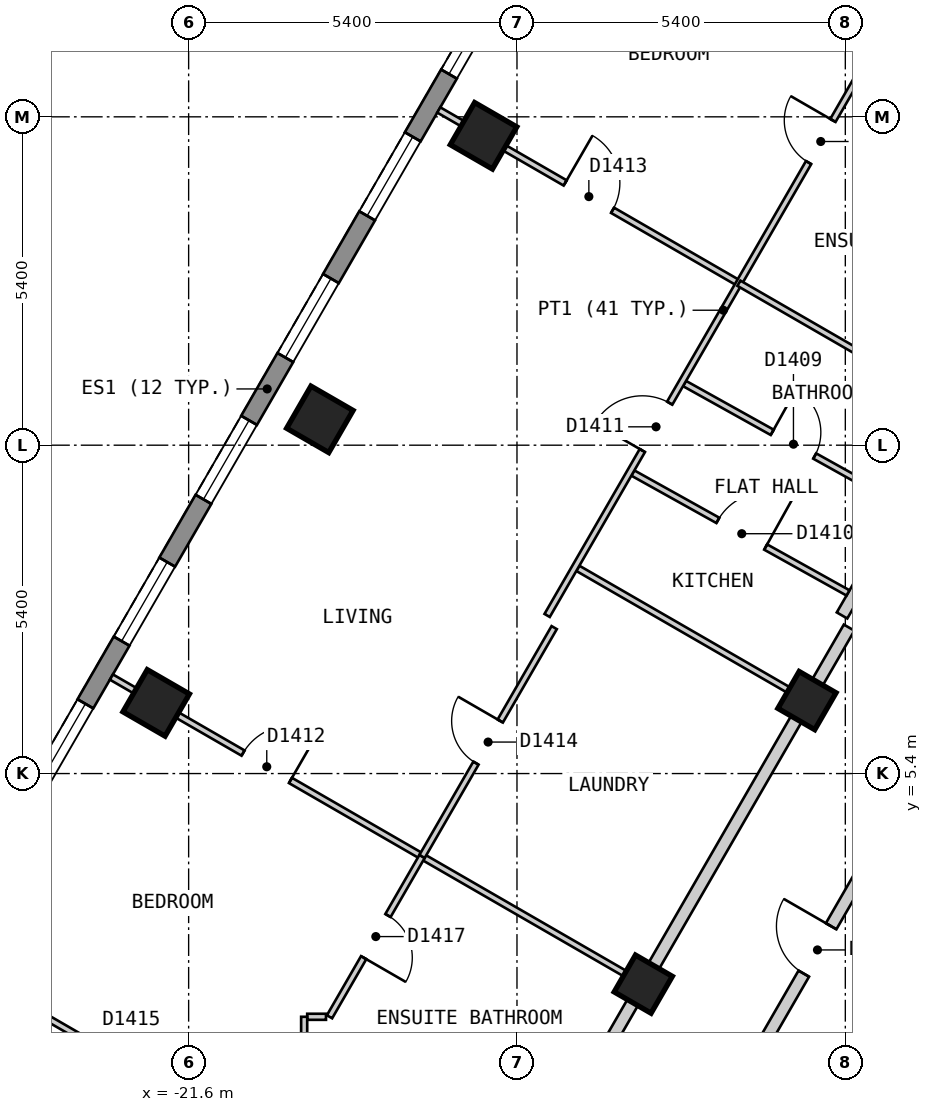
"""IFC4 building model, lengths in metres.
Left out: names, types, materials, properties, quantities, classifications, styles, units other than length and angle.
Written with IfcOpenShell. Run it as: python <this file> out.ifc"""

import sys

from ifc_helpers import new_model, si_unit, direction, frame, frame_2d, origin, origin_2d, place, context, subcontext, project, spatial, polyline, rectangle, outline, extrude, element, fill, save


model = new_model("IFC4")
c1 = context("Model", 3, precision=1e-05, world=origin(), true_north=direction((0.0, 1.0)))
c2 = subcontext(c1, "Body", "Model", "MODEL_VIEW")
j1 = project(units=[si_unit("LENGTHUNIT", "METRE"), si_unit("PLANEANGLEUNIT", "RADIAN")], contexts=[c1])
p1 = place(None, origin())
s1 = spatial("IfcSite", under=j1, at=p1, CompositionType="ELEMENT")
p2 = place(p1, origin())
s2 = spatial("IfcBuilding", under=s1, at=p2, CompositionType="ELEMENT")
p3 = place(p2, frame((0.0, 0.0, 172.2)))
s3 = spatial("IfcBuildingStorey", under=s2, at=p3, CompositionType="ELEMENT", Elevation=172.2)
for number, where, z_axis, x_axis in (
    (1, (-16.75, 15.888, 0.0), (0.0, 0.0, 1.0), (-0.5, -0.866, 0.0)),
    (2, (-19.442, 11.225, 0.0), (0.0, 0.0, 1.0), (-0.5, -0.866, 0.0)),
    (3, (-22.134, 6.562, 0.0), (0.0, 0.0, 1.0), (-0.5, -0.866, 0.0)),
):
    element("IfcColumn", number, at=place(p3, frame(where, z_axis=z_axis, x_axis=x_axis)), inside=s3, PredefinedType="COLUMN", context=c2, shape_type="SweptSolid", body=[
        extrude(rectangle(XDim=0.8, YDim=0.8, at=origin_2d()), origin(), (0.0, 0.0, 1.0), 3.0),
    ])
for number, where, z_axis, x_axis in (
    (4, (-11.431, 6.6, 0.0), (0.0, 0.0, 1.0), (-0.5, -0.866, 0.0)),
    (5, (-14.123, 1.937, 0.0), (0.0, 0.0, 1.0), (-0.5, -0.866, 0.0)),
):
    element("IfcColumn", number, at=place(p3, frame(where, z_axis=z_axis, x_axis=x_axis)), inside=s3, PredefinedType="COLUMN", context=c2, shape_type="SweptSolid", body=[
        extrude(rectangle(XDim=0.7, YDim=0.7, at=origin_2d()), origin(), (0.0, 0.0, 1.0), 3.0),
    ])
p4 = place(p3, frame((-14.592, 21.625, 0.0), z_axis=(0.0, 0.0, 1.0), x_axis=(-0.500010537973, -0.866019319597, 0.0)))
e6 = element("IfcWall", 6, at=p4, inside=s3, PredefinedType="SOLIDWALL", context=c2, shape_type="SweptSolid", body=[
    extrude(outline(polyline([(0.0, -0.15), (22.863, -0.15), (22.783, 0.15), (0.08, 0.15), (0.0, -0.15)])), origin(), (0.0, 0.0, 1.0), 2.7),
])
p5 = place(p4, frame((1.259, 0.0, 0.15)))
e7 = element("IfcOpeningElement", 7, at=p5, cuts=e6, PredefinedType="OPENING", context=c2, shape_type="SweptSolid", body=[
    extrude(rectangle(XDim=1.5, YDim=2.1, at=frame_2d((0.75, 1.05))), frame((0.0, 0.16, 0.0), z_axis=(0.0, -1.0, 0.0), x_axis=(1.0, 0.0, 0.0)), (0.0, 0.0, 1.0), 0.32),
])
p6 = place(p4, frame((3.952, 0.0, 0.15)))
e8 = element("IfcOpeningElement", 8, at=p6, cuts=e6, PredefinedType="OPENING", context=c2, shape_type="SweptSolid", body=[
    extrude(rectangle(XDim=1.5, YDim=2.1, at=frame_2d((0.75, 1.05))), frame((0.0, 0.16, 0.0), z_axis=(0.0, -1.0, 0.0), x_axis=(1.0, 0.0, 0.0)), (0.0, 0.0, 1.0), 0.32),
])
p7 = place(p4, frame((6.644, 0.0, 0.15)))
e9 = element("IfcOpeningElement", 9, at=p7, cuts=e6, PredefinedType="OPENING", context=c2, shape_type="SweptSolid", body=[
    extrude(rectangle(XDim=1.5, YDim=2.1, at=frame_2d((0.75, 1.05))), frame((0.0, 0.16, 0.0), z_axis=(0.0, -1.0, 0.0), x_axis=(1.0, 0.0, 0.0)), (0.0, 0.0, 1.0), 0.32),
])
p8 = place(p4, frame((9.335, 0.0, 0.15)))
e10 = element("IfcOpeningElement", 10, at=p8, cuts=e6, PredefinedType="OPENING", context=c2, shape_type="SweptSolid", body=[
    extrude(rectangle(XDim=1.5, YDim=2.1, at=frame_2d((0.75, 1.05))), frame((0.0, 0.16, 0.0), z_axis=(0.0, -1.0, 0.0), x_axis=(1.0, 0.0, 0.0)), (0.0, 0.0, 1.0), 0.32),
])
p9 = place(p4, frame((12.028, 0.0, 0.15)))
e11 = element("IfcOpeningElement", 11, at=p9, cuts=e6, PredefinedType="OPENING", context=c2, shape_type="SweptSolid", body=[
    extrude(rectangle(XDim=1.5, YDim=2.1, at=frame_2d((0.75, 1.05))), frame((0.0, 0.16, 0.0), z_axis=(0.0, -1.0, 0.0), x_axis=(1.0, 0.0, 0.0)), (0.0, 0.0, 1.0), 0.32),
])
p10 = place(p4, frame((14.72, 0.0, 0.15)))
e12 = element("IfcOpeningElement", 12, at=p10, cuts=e6, PredefinedType="OPENING", context=c2, shape_type="SweptSolid", body=[
    extrude(rectangle(XDim=1.5, YDim=2.1, at=frame_2d((0.75, 1.05))), frame((0.0, 0.16, 0.0), z_axis=(0.0, -1.0, 0.0), x_axis=(1.0, 0.0, 0.0)), (0.0, 0.0, 1.0), 0.32),
])
p11 = place(p4, frame((17.411, 0.0, 0.15)))
e13 = element("IfcOpeningElement", 13, at=p11, cuts=e6, PredefinedType="OPENING", context=c2, shape_type="SweptSolid", body=[
    extrude(rectangle(XDim=1.5, YDim=2.1, at=frame_2d((0.75, 1.05))), frame((0.0, 0.16, 0.0), z_axis=(0.0, -1.0, 0.0), x_axis=(1.0, 0.0, 0.0)), (0.0, 0.0, 1.0), 0.32),
])
p12 = place(p4, frame((20.104, 0.0, 0.15)))
e14 = element("IfcOpeningElement", 14, at=p12, cuts=e6, PredefinedType="OPENING", context=c2, shape_type="SweptSolid", body=[
    extrude(rectangle(XDim=1.5, YDim=2.1, at=frame_2d((0.75, 1.05))), frame((0.0, 0.16, 0.0), z_axis=(0.0, -1.0, 0.0), x_axis=(1.0, 0.0, 0.0)), (0.0, 0.0, 1.0), 0.32),
])
p13 = place(p3, frame((-13.048, -0.601, 0.0), z_axis=(0.0, 0.0, 1.0), x_axis=(0.499982180423, 0.866035691677, 0.0)))
e15 = element("IfcWall", 15, at=p13, inside=s3, PredefinedType="PARTITIONING", context=c2, shape_type="SweptSolid", body=[
    extrude(rectangle(XDim=7.16, YDim=0.2, at=frame_2d((3.58, 0.0))), origin(), (0.0, 0.0, 1.0), 2.7),
])
p14 = place(p13, frame((3.13, 0.0, 0.0)))
e16 = element("IfcOpeningElement", 16, at=p14, cuts=e15, PredefinedType="OPENING", context=c2, shape_type="SweptSolid", body=[
    extrude(rectangle(XDim=0.9, YDim=2.1, at=frame_2d((0.45, 1.05))), frame((0.0, 0.11, 0.0), z_axis=(0.0, -1.0, 0.0), x_axis=(1.0, 0.0, 0.0)), (0.0, 0.0, 1.0), 0.22),
])
p15 = place(p3, frame((-15.53, -0.501, 0.0), z_axis=(0.0, 0.0, 1.0), x_axis=(0.499952498232, 0.866052827206, 0.0)))
e17 = element("IfcWall", 17, at=p15, inside=s3, PredefinedType="PARTITIONING", context=c2, shape_type="SweptSolid", body=[
    extrude(rectangle(XDim=9.585, YDim=0.2, at=frame_2d((4.792, 0.0))), origin(), (0.0, 0.0, 1.0), 2.7),
])
p16 = place(p3, frame((-10.854, 8.0, 0.0), z_axis=(0.0, 0.0, 1.0), x_axis=(0.499997637144, 0.866026767976, 0.0)))
e18 = element("IfcWall", 18, at=p16, inside=s3, PredefinedType="PARTITIONING", context=c2, shape_type="SweptSolid", body=[
    extrude(rectangle(XDim=10.854, YDim=0.2, at=frame_2d((5.427, 0.0))), origin(), (0.0, 0.0, 1.0), 2.7),
])
p17 = place(p16, frame((0.721, 0.0, 0.0)))
e19 = element("IfcOpeningElement", 19, at=p17, cuts=e18, PredefinedType="OPENING", context=c2, shape_type="SweptSolid", body=[
    extrude(rectangle(XDim=1.0, YDim=2.1, at=frame_2d((0.5, 1.05))), frame((0.0, 0.11, 0.0), z_axis=(0.0, -1.0, 0.0), x_axis=(1.0, 0.0, 0.0)), (0.0, 0.0, 1.0), 0.22),
])
p18 = place(p3, frame((-13.444, 11.814, 0.0), z_axis=(0.0, 0.0, 1.0), x_axis=(0.873653620945, -0.486548405207, 0.0)))
e20 = element("IfcWall", 20, at=p18, inside=s3, PredefinedType="PARTITIONING", context=c2, shape_type="SweptSolid", body=[
    extrude(rectangle(XDim=4.051, YDim=0.1, at=frame_2d((2.025, 0.0))), origin(), (0.0, 0.0, 1.0), 2.7),
])
p19 = place(p18, frame((1.65, 0.0, 0.0)))
e21 = element("IfcOpeningElement", 21, at=p19, cuts=e20, PredefinedType="OPENING", context=c2, shape_type="SweptSolid", body=[
    extrude(rectangle(XDim=0.8, YDim=2.1, at=frame_2d((0.4, 1.05))), frame((0.0, 0.06, 0.0), z_axis=(0.0, -1.0, 0.0), x_axis=(1.0, 0.0, 0.0)), (0.0, 0.0, 1.0), 0.12),
])
p20 = place(p3, frame((-14.294, 10.342, 0.0), z_axis=(0.0, 0.0, 1.0), x_axis=(0.873582256032, -0.486676527013, 0.0)))
e22 = element("IfcWall", 22, at=p20, inside=s3, PredefinedType="PARTITIONING", context=c2, shape_type="SweptSolid", body=[
    extrude(rectangle(XDim=4.05, YDim=0.1, at=frame_2d((2.025, 0.0))), origin(), (0.0, 0.0, 1.0), 2.7),
])
p21 = place(p20, frame((1.6, 0.0, 0.0)))
e23 = element("IfcOpeningElement", 23, at=p21, cuts=e22, PredefinedType="OPENING", context=c2, shape_type="SweptSolid", body=[
    extrude(rectangle(XDim=0.9, YDim=2.1, at=frame_2d((0.45, 1.05))), frame((0.0, 0.06, 0.0), z_axis=(0.0, -1.0, 0.0), x_axis=(1.0, 0.0, 0.0)), (0.0, 0.0, 1.0), 0.12),
])
p22 = place(p3, frame((-22.87, 6.987, 0.0), z_axis=(0.0, 0.0, 1.0), x_axis=(0.866022959057, -0.500004234368, 0.0)))
e24 = element("IfcWall", 24, at=p22, inside=s3, PredefinedType="PARTITIONING", context=c2, shape_type="SweptSolid", body=[
    extrude(rectangle(XDim=10.0, YDim=0.1, at=frame_2d((5.0, 0.0))), origin(), (0.0, 0.0, 1.0), 2.7),
])
p23 = place(p22, frame((2.5, 0.0, 0.0)))
e25 = element("IfcOpeningElement", 25, at=p23, cuts=e24, PredefinedType="OPENING", context=c2, shape_type="SweptSolid", body=[
    extrude(rectangle(XDim=0.9, YDim=2.1, at=frame_2d((0.45, 1.05))), frame((0.0, 0.06, 0.0), z_axis=(0.0, -1.0, 0.0), x_axis=(1.0, 0.0, 0.0)), (0.0, 0.0, 1.0), 0.12),
])
p24 = place(p3, frame((-25.562, 2.325, 0.0), z_axis=(0.0, 0.0, 1.0), x_axis=(0.865998530728, -0.500046542611, 0.0)))
e26 = element("IfcWall", 26, at=p24, inside=s3, PredefinedType="PARTITIONING", context=c2, shape_type="SweptSolid", body=[
    extrude(rectangle(XDim=5.651, YDim=0.1, at=frame_2d((2.826, 0.0))), origin(), (0.0, 0.0, 1.0), 2.7),
])
p25 = place(p24, frame((2.476, 0.0, 0.0)))
e27 = element("IfcOpeningElement", 27, at=p25, cuts=e26, PredefinedType="OPENING", context=c2, shape_type="SweptSolid", body=[
    extrude(rectangle(XDim=0.9, YDim=2.1, at=frame_2d((0.45, 1.05))), frame((0.0, 0.06, 0.0), z_axis=(0.0, -1.0, 0.0), x_axis=(1.0, 0.0, 0.0)), (0.0, 0.0, 1.0), 0.12),
])
p26 = place(p3, frame((-15.199, 8.775, 0.0), z_axis=(0.0, 0.0, 1.0), x_axis=(0.866043063166, -0.499969411806, 0.0)))
e28 = element("IfcWall", 28, at=p26, inside=s3, PredefinedType="PARTITIONING", context=c2, shape_type="SweptSolid", body=[
    extrude(rectangle(XDim=4.25, YDim=0.1, at=frame_2d((2.125, 0.0))), origin(), (0.0, 0.0, 1.0), 2.7),
])
p27 = place(p3, frame((-17.486, 16.313, 0.0), z_axis=(0.0, 0.0, 1.0), x_axis=(0.866004402611, -0.500036373335, 0.0)))
e29 = element("IfcWall", 29, at=p27, inside=s3, PredefinedType="PARTITIONING", context=c2, shape_type="SweptSolid", body=[
    extrude(rectangle(XDim=5.7, YDim=0.1, at=frame_2d((2.85, 0.0))), origin(), (0.0, 0.0, 1.0), 2.7),
])
p28 = place(p27, frame((2.4, 0.0, 0.0)))
e30 = element("IfcOpeningElement", 30, at=p28, cuts=e29, PredefinedType="OPENING", context=c2, shape_type="SweptSolid", body=[
    extrude(rectangle(XDim=0.9, YDim=2.1, at=frame_2d((0.45, 1.05))), frame((0.0, 0.06, 0.0), z_axis=(0.0, -1.0, 0.0), x_axis=(1.0, 0.0, 0.0)), (0.0, 0.0, 1.0), 0.12),
])
p29 = place(p3, frame((-19.65, 1.4, 0.0), z_axis=(0.0, 0.0, 1.0), x_axis=(1.0, 0.0, 0.0)))
e31 = element("IfcWall", 31, at=p29, inside=s3, PredefinedType="PARTITIONING", context=c2, shape_type="SweptSolid", body=[
    extrude(rectangle(XDim=0.309, YDim=0.1, at=frame_2d((0.154, 0.0))), origin(), (0.0, 0.0, 1.0), 2.7),
])
p30 = place(p3, frame((-19.283, 1.4, 0.0), z_axis=(0.0, 0.0, 1.0), x_axis=(0.499847391584, 0.866113494368, 0.0)))
e32 = element("IfcWall", 32, at=p30, inside=s3, PredefinedType="PARTITIONING", context=c2, shape_type="SweptSolid", body=[
    extrude(rectangle(XDim=3.045, YDim=0.1, at=frame_2d((1.522, 0.0))), origin(), (0.0, 0.0, 1.0), 2.7),
])
p31 = place(p30, frame((1.123, 0.0, 0.0)))
e33 = element("IfcOpeningElement", 33, at=p31, cuts=e32, PredefinedType="OPENING", context=c2, shape_type="SweptSolid", body=[
    extrude(rectangle(XDim=0.8, YDim=2.1, at=frame_2d((0.4, 1.05))), frame((0.0, 0.06, 0.0), z_axis=(0.0, -1.0, 0.0), x_axis=(1.0, 0.0, 0.0)), (0.0, 0.0, 1.0), 0.12),
])
p32 = place(p3, frame((-15.704, 8.0, 0.0), z_axis=(0.0, 0.0, 1.0), x_axis=(0.500005637941, 0.866022148693, 0.0)))
e34 = element("IfcWall", 34, at=p32, inside=s3, PredefinedType="PARTITIONING", context=c2, shape_type="SweptSolid", body=[
    extrude(rectangle(XDim=11.592, YDim=0.1, at=frame_2d((5.796, 0.0))), origin(), (0.0, 0.0, 1.0), 2.7),
])
p33 = place(p32, frame((3.132, 0.0, 0.0)))
e35 = element("IfcOpeningElement", 35, at=p33, cuts=e34, PredefinedType="OPENING", context=c2, shape_type="SweptSolid", body=[
    extrude(rectangle(XDim=0.9, YDim=2.1, at=frame_2d((0.45, 1.05))), frame((0.0, 0.06, 0.0), z_axis=(0.0, -1.0, 0.0), x_axis=(1.0, 0.0, 0.0)), (0.0, 0.0, 1.0), 0.12),
])
p34 = place(p32, frame((8.6, 0.0, 0.0)))
e36 = element("IfcOpeningElement", 36, at=p34, cuts=e34, PredefinedType="OPENING", context=c2, shape_type="SweptSolid", body=[
    extrude(rectangle(XDim=0.8, YDim=2.1, at=frame_2d((0.4, 1.05))), frame((0.0, 0.06, 0.0), z_axis=(0.0, -1.0, 0.0), x_axis=(1.0, 0.0, 0.0)), (0.0, 0.0, 1.0), 0.12),
])
p35 = place(p3, frame((-19.7, 0.678, 0.0), z_axis=(0.0, 0.0, 1.0), x_axis=(0.0, 1.0, 0.0)))
e37 = element("IfcWall", 37, at=p35, inside=s3, PredefinedType="PARTITIONING", context=c2, shape_type="SweptSolid", body=[
    extrude(rectangle(XDim=0.722, YDim=0.1, at=frame_2d((0.361, 0.0))), origin(), (0.0, 0.0, 1.0), 2.7),
])
p36 = place(p3, frame((-17.761, 4.037, 0.0), z_axis=(0.0, 0.0, 1.0), x_axis=(0.50009692756, 0.865969435399, 0.0)))
e38 = element("IfcWall", 38, at=p36, inside=s3, PredefinedType="PARTITIONING", context=c2, shape_type="SweptSolid", body=[
    extrude(rectangle(XDim=4.345, YDim=0.1, at=frame_2d((2.173, 0.0))), origin(), (0.0, 0.0, 1.0), 2.7),
])
p37 = place(p36, frame((1.772, 0.0, 0.0)))
e39 = element("IfcOpeningElement", 39, at=p37, cuts=e38, PredefinedType="OPENING", context=c2, shape_type="SweptSolid", body=[
    extrude(rectangle(XDim=0.8, YDim=2.1, at=frame_2d((0.4, 1.05))), frame((0.0, 0.06, 0.0), z_axis=(0.0, -1.0, 0.0), x_axis=(1.0, 0.0, 0.0)), (0.0, 0.0, 1.0), 0.12),
])
p38 = place(p3, frame((-12.55, 13.463, 0.0), z_axis=(0.0, 0.0, 1.0), x_axis=(0.86606561423, -0.499930346997, 0.0)))
e40 = element("IfcWall", 40, at=p38, inside=s3, PredefinedType="PARTITIONING", context=c2, shape_type="SweptSolid", body=[
    extrude(rectangle(XDim=4.1, YDim=0.1, at=frame_2d((2.05, 0.0))), origin(), (0.0, 0.0, 1.0), 2.7),
])
p39 = place(p6, origin())
e41 = element("IfcWindow", 41, at=p39, inside=s3, PartitioningType="SINGLE_PANEL", PredefinedType="WINDOW", context=c2, shape_type="SweptSolid", body=[
    extrude(rectangle(XDim=1.5, YDim=2.1, at=frame_2d((0.75, 1.05))), frame((0.0, 0.03, 0.0), z_axis=(0.0, -1.0, 0.0), x_axis=(1.0, 0.0, 0.0)), (0.0, 0.0, 1.0), 0.06),
])
fill(e8, e41)
p40 = place(p7, origin())
e42 = element("IfcWindow", 42, at=p40, inside=s3, PartitioningType="SINGLE_PANEL", PredefinedType="WINDOW", context=c2, shape_type="SweptSolid", body=[
    extrude(rectangle(XDim=1.5, YDim=2.1, at=frame_2d((0.75, 1.05))), frame((0.0, 0.03, 0.0), z_axis=(0.0, -1.0, 0.0), x_axis=(1.0, 0.0, 0.0)), (0.0, 0.0, 1.0), 0.06),
])
fill(e9, e42)
p41 = place(p8, origin())
e43 = element("IfcWindow", 43, at=p41, inside=s3, PartitioningType="SINGLE_PANEL", PredefinedType="WINDOW", context=c2, shape_type="SweptSolid", body=[
    extrude(rectangle(XDim=1.5, YDim=2.1, at=frame_2d((0.75, 1.05))), frame((0.0, 0.03, 0.0), z_axis=(0.0, -1.0, 0.0), x_axis=(1.0, 0.0, 0.0)), (0.0, 0.0, 1.0), 0.06),
])
fill(e10, e43)
p42 = place(p9, origin())
e44 = element("IfcWindow", 44, at=p42, inside=s3, PartitioningType="SINGLE_PANEL", PredefinedType="WINDOW", context=c2, shape_type="SweptSolid", body=[
    extrude(rectangle(XDim=1.5, YDim=2.1, at=frame_2d((0.75, 1.05))), frame((0.0, 0.03, 0.0), z_axis=(0.0, -1.0, 0.0), x_axis=(1.0, 0.0, 0.0)), (0.0, 0.0, 1.0), 0.06),
])
fill(e11, e44)
p43 = place(p10, origin())
e45 = element("IfcWindow", 45, at=p43, inside=s3, PartitioningType="SINGLE_PANEL", PredefinedType="WINDOW", context=c2, shape_type="SweptSolid", body=[
    extrude(rectangle(XDim=1.5, YDim=2.1, at=frame_2d((0.75, 1.05))), frame((0.0, 0.03, 0.0), z_axis=(0.0, -1.0, 0.0), x_axis=(1.0, 0.0, 0.0)), (0.0, 0.0, 1.0), 0.06),
])
fill(e12, e45)
p44 = place(p11, origin())
e46 = element("IfcWindow", 46, at=p44, inside=s3, PartitioningType="SINGLE_PANEL", PredefinedType="WINDOW", context=c2, shape_type="SweptSolid", body=[
    extrude(rectangle(XDim=1.5, YDim=2.1, at=frame_2d((0.75, 1.05))), frame((0.0, 0.03, 0.0), z_axis=(0.0, -1.0, 0.0), x_axis=(1.0, 0.0, 0.0)), (0.0, 0.0, 1.0), 0.06),
])
fill(e13, e46)
p45 = place(p19, origin())
e47 = element("IfcDoor", 47, at=p45, inside=s3, OperationType="SINGLE_SWING_LEFT", PredefinedType="DOOR", context=c2, shape_type="SweptSolid", body=[
    extrude(rectangle(XDim=0.8, YDim=2.1, at=frame_2d((0.4, 1.05))), frame((0.0, 0.025, 0.0), z_axis=(0.0, -1.0, 0.0), x_axis=(1.0, 0.0, 0.0)), (0.0, 0.0, 1.0), 0.05),
])
fill(e21, e47)
p46 = place(p21, origin())
e48 = element("IfcDoor", 48, at=p46, inside=s3, OperationType="SINGLE_SWING_RIGHT", PredefinedType="DOOR", context=c2, shape_type="SweptSolid", body=[
    extrude(rectangle(XDim=0.9, YDim=2.1, at=frame_2d((0.45, 1.05))), frame((0.0, 0.025, 0.0), z_axis=(0.0, -1.0, 0.0), x_axis=(1.0, 0.0, 0.0)), (0.0, 0.0, 1.0), 0.05),
])
fill(e23, e48)
p47 = place(p33, origin())
e49 = element("IfcDoor", 49, at=p47, inside=s3, OperationType="SINGLE_SWING_LEFT", PredefinedType="DOOR", context=c2, shape_type="SweptSolid", body=[
    extrude(rectangle(XDim=0.9, YDim=2.1, at=frame_2d((0.45, 1.05))), frame((0.0, 0.025, 0.0), z_axis=(0.0, -1.0, 0.0), x_axis=(1.0, 0.0, 0.0)), (0.0, 0.0, 1.0), 0.05),
])
fill(e35, e49)
p48 = place(p23, origin())
e50 = element("IfcDoor", 50, at=p48, inside=s3, OperationType="SINGLE_SWING_RIGHT", PredefinedType="DOOR", context=c2, shape_type="SweptSolid", body=[
    extrude(rectangle(XDim=0.9, YDim=2.1, at=frame_2d((0.45, 1.05))), frame((0.0, 0.025, 0.0), z_axis=(0.0, -1.0, 0.0), x_axis=(1.0, 0.0, 0.0)), (0.0, 0.0, 1.0), 0.05),
])
fill(e25, e50)
p49 = place(p28, origin())
e51 = element("IfcDoor", 51, at=p49, inside=s3, OperationType="SINGLE_SWING_LEFT", PredefinedType="DOOR", context=c2, shape_type="SweptSolid", body=[
    extrude(rectangle(XDim=0.9, YDim=2.1, at=frame_2d((0.45, 1.05))), frame((0.0, 0.025, 0.0), z_axis=(0.0, -1.0, 0.0), x_axis=(1.0, 0.0, 0.0)), (0.0, 0.0, 1.0), 0.05),
])
fill(e30, e51)
p50 = place(p37, origin())
e52 = element("IfcDoor", 52, at=p50, inside=s3, OperationType="SINGLE_SWING_RIGHT", PredefinedType="DOOR", context=c2, shape_type="SweptSolid", body=[
    extrude(rectangle(XDim=0.8, YDim=2.1, at=frame_2d((0.4, 1.05))), frame((0.0, 0.025, 0.0), z_axis=(0.0, -1.0, 0.0), x_axis=(1.0, 0.0, 0.0)), (0.0, 0.0, 1.0), 0.05),
])
fill(e39, e52)
p51 = place(p34, origin())
e53 = element("IfcDoor", 53, at=p51, inside=s3, OperationType="SINGLE_SWING_RIGHT", PredefinedType="DOOR", context=c2, shape_type="SweptSolid", body=[
    extrude(rectangle(XDim=0.8, YDim=2.1, at=frame_2d((0.4, 1.05))), frame((0.0, 0.025, 0.0), z_axis=(0.0, -1.0, 0.0), x_axis=(1.0, 0.0, 0.0)), (0.0, 0.0, 1.0), 0.05),
])
fill(e36, e53)
p52 = place(p31, origin())
e54 = element("IfcDoor", 54, at=p52, inside=s3, OperationType="SINGLE_SWING_LEFT", PredefinedType="DOOR", context=c2, shape_type="SweptSolid", body=[
    extrude(rectangle(XDim=0.8, YDim=2.1, at=frame_2d((0.4, 1.05))), frame((0.0, 0.025, 0.0), z_axis=(0.0, -1.0, 0.0), x_axis=(1.0, 0.0, 0.0)), (0.0, 0.0, 1.0), 0.05),
])
fill(e33, e54)
p53 = place(p14, origin())
e55 = element("IfcDoor", 55, at=p53, inside=s3, OperationType="SINGLE_SWING_RIGHT", PredefinedType="DOOR", context=c2, shape_type="SweptSolid", body=[
    extrude(rectangle(XDim=0.9, YDim=2.1, at=frame_2d((0.45, 1.05))), frame((0.0, 0.025, 0.0), z_axis=(0.0, -1.0, 0.0), x_axis=(1.0, 0.0, 0.0)), (0.0, 0.0, 1.0), 0.05),
])
fill(e16, e55)
save(model, sys.argv[1])
